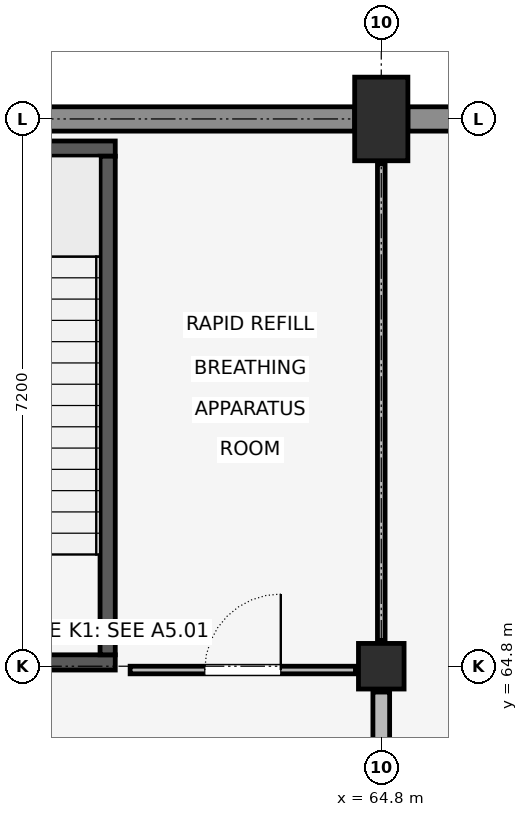
"""IFC4 building model, lengths in metres.
Left out: names, types, materials, properties, quantities, classifications, styles, units other than length and angle.
Written with IfcOpenShell. Run it as: python <this file> out.ifc"""

import sys

from ifc_helpers import new_model, si_unit, direction, frame, frame_2d, origin, origin_2d, place, context, subcontext, project, spatial, rectangle, extrude, element, fill, save


model = new_model("IFC4")
c1 = context("Model", 3, precision=1e-05, world=origin(), true_north=direction((0.0, 1.0)))
c2 = subcontext(c1, "Body", "Model", "MODEL_VIEW")
j1 = project(units=[si_unit("LENGTHUNIT", "METRE"), si_unit("PLANEANGLEUNIT", "RADIAN")], contexts=[c1])
p1 = place(None, origin())
s1 = spatial("IfcSite", under=j1, at=p1, CompositionType="ELEMENT")
p2 = place(p1, origin())
s2 = spatial("IfcBuilding", under=s1, at=p2, CompositionType="ELEMENT")
p3 = place(p2, origin())
s3 = spatial("IfcBuildingStorey", under=s2, at=p3, CompositionType="ELEMENT", Elevation=0.0)
p4 = place(p3, frame((64.8, 64.8, 0.0), z_axis=(0.0, 0.0, 1.0), x_axis=(1.0, 0.0, 0.0)))
e1 = element("IfcColumn", 1, at=p4, inside=s3, PredefinedType="COLUMN", context=c2, shape_type="SweptSolid", body=[
    extrude(rectangle(XDim=0.6, YDim=0.6, at=origin_2d()), origin(), (0.0, 0.0, 1.0), 5.4),
])
p5 = place(p3, frame((64.8, 72.0, 0.0), z_axis=(0.0, 0.0, 1.0), x_axis=(1.0, 0.0, 0.0)))
e2 = element("IfcColumn", 2, at=p5, inside=s3, PredefinedType="PILASTER", context=c2, shape_type="SweptSolid", body=[
    extrude(rectangle(XDim=0.7, YDim=1.1, at=origin_2d()), origin(), (0.0, 0.0, 1.0), 5.4),
])
p6 = place(p3, frame((57.9, 64.85, 0.0), z_axis=(0.0, 0.0, 1.0), x_axis=(1.0, 0.0, 0.0)))
e3 = element("IfcWall", 3, at=p6, inside=s3, PredefinedType="SHEAR", context=c2, shape_type="SweptSolid", body=[
    extrude(rectangle(XDim=3.4, YDim=0.2, at=frame_2d((1.7, 0.0))), origin(), (0.0, 0.0, 1.0), 5.15),
])
p7 = place(p6, frame((1.15, 0.0, 0.0)))
e4 = element("IfcOpeningElement", 4, at=p7, cuts=e3, PredefinedType="OPENING", context=c2, shape_type="SweptSolid", body=[
    extrude(rectangle(XDim=1.1, YDim=2.15, at=frame_2d((0.55, 1.075))), frame((0.0, 0.112, 0.0), z_axis=(0.0, -1.0, 0.0), x_axis=(1.0, 0.0, 0.0)), (0.0, 0.0, 1.0), 0.224),
])
p8 = place(p3, frame((57.95, 71.61, 0.0), z_axis=(0.0, 0.0, 1.0), x_axis=(1.0, 0.0, 0.0)))
e5 = element("IfcWall", 5, at=p8, inside=s3, PredefinedType="SHEAR", context=c2, shape_type="SweptSolid", body=[
    extrude(rectangle(XDim=3.35, YDim=0.2, at=frame_2d((1.675, 0.0))), origin(), (0.0, 0.0, 1.0), 5.15),
])
p9 = place(p3, frame((61.2, 64.95, 0.0), z_axis=(0.0, 0.0, 1.0), x_axis=(0.0, 1.0, 0.0)))
e6 = element("IfcWall", 6, at=p9, inside=s3, PredefinedType="SHEAR", context=c2, shape_type="SweptSolid", body=[
    extrude(rectangle(XDim=6.56, YDim=0.2, at=frame_2d((3.28, 0.0))), origin(), (0.0, 0.0, 1.0), 5.15),
])
p10 = place(p3, frame((71.65, 72.0, 0.0), z_axis=(0.0, 0.0, 1.0), x_axis=(-1.0, 0.0, 0.0)))
e7 = element("IfcWall", 7, at=p10, inside=s3, PredefinedType="ELEMENTEDWALL", context=c2, shape_type="SweptSolid", body=[
    extrude(rectangle(XDim=6.5, YDim=0.32, at=frame_2d((3.25, 0.0))), origin(), (0.0, 0.0, 1.0), 4.49),
])
p11 = place(p10, frame((1.15, 0.0, 0.0)))
e8 = element("IfcOpeningElement", 8, at=p11, cuts=e7, PredefinedType="OPENING", context=c2, shape_type="SweptSolid", body=[
    extrude(rectangle(XDim=4.2, YDim=4.2, at=frame_2d((2.1, 2.1))), frame((0.0, 0.172, 0.0), z_axis=(0.0, -1.0, 0.0), x_axis=(1.0, 0.0, 0.0)), (0.0, 0.0, 1.0), 0.344),
])
p12 = place(p3, frame((64.45, 72.0, 0.0), z_axis=(0.0, 0.0, 1.0), x_axis=(-1.0, 0.0, 0.0)))
e9 = element("IfcWall", 9, at=p12, inside=s3, PredefinedType="ELEMENTEDWALL", context=c2, shape_type="SweptSolid", body=[
    extrude(rectangle(XDim=6.5, YDim=0.32, at=frame_2d((3.25, 0.0))), origin(), (0.0, 0.0, 1.0), 4.49),
])
p13 = place(p3, frame((61.496, 64.75, 0.0), z_axis=(0.0, 0.0, 1.0), x_axis=(1.0, 0.0, 0.0)))
e10 = element("IfcWall", 10, at=p13, inside=s3, PredefinedType="PARTITIONING", context=c2, shape_type="SweptSolid", body=[
    extrude(rectangle(XDim=2.964, YDim=0.1, at=frame_2d((1.482, 0.0))), origin(), (0.0, 0.0, 1.0), 5.12),
])
p14 = place(p13, frame((0.982, 0.0, 0.0)))
e11 = element("IfcOpeningElement", 11, at=p14, cuts=e10, PredefinedType="OPENING", context=c2, shape_type="SweptSolid", body=[
    extrude(rectangle(XDim=1.0, YDim=2.15, at=frame_2d((0.5, 1.075))), frame((0.0, 0.062, 0.0), z_axis=(0.0, -1.0, 0.0), x_axis=(1.0, 0.0, 0.0)), (0.0, 0.0, 1.0), 0.124),
])
p15 = place(p3, frame((64.8, 65.14, 0.0), z_axis=(0.0, 0.0, 1.0), x_axis=(0.0, 1.0, 0.0)))
e12 = element("IfcWall", 12, at=p15, inside=s3, PredefinedType="PARTITIONING", context=c2, shape_type="SweptSolid", body=[
    extrude(rectangle(XDim=6.27, YDim=0.1, at=frame_2d((3.135, 0.0))), origin(), (0.0, 0.0, 1.0), 4.488),
])
p16 = place(p3, frame((64.8, 57.94, 0.0), z_axis=(0.0, 0.0, 1.0), x_axis=(0.0, 1.0, 0.0)))
e13 = element("IfcWall", 13, at=p16, inside=s3, PredefinedType="STANDARD", context=c2, shape_type="SweptSolid", body=[
    extrude(rectangle(XDim=6.52, YDim=0.22, at=frame_2d((3.26, 0.0))), origin(), (0.0, 0.0, 1.0), 4.538),
])
p17 = place(p14, origin())
e14 = element("IfcDoor", 14, at=p17, inside=s3, OperationType="SINGLE_SWING_RIGHT", PredefinedType="DOOR", context=c2, shape_type="SweptSolid", body=[
    extrude(rectangle(XDim=1.0, YDim=2.15, at=frame_2d((0.5, 1.075))), frame((0.0, 0.025, 0.0), z_axis=(0.0, -1.0, 0.0), x_axis=(1.0, 0.0, 0.0)), (0.0, 0.0, 1.0), 0.05),
])
fill(e11, e14)
save(model, sys.argv[1])
